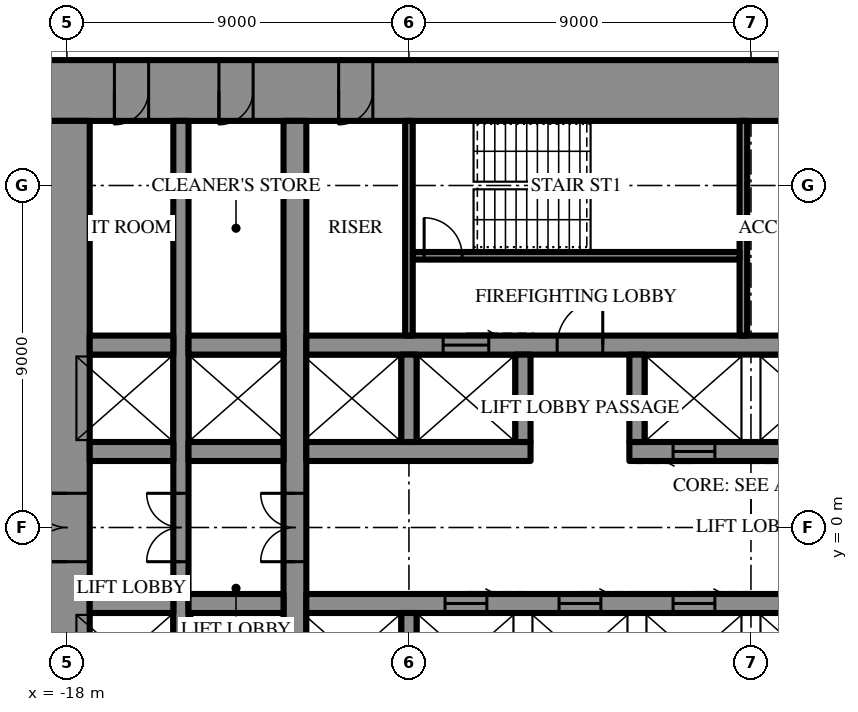
"""IFC4 building model, lengths in metres.
Left out: names, types, materials, properties, quantities, classifications, styles, units other than length and angle.
Written with IfcOpenShell. Run it as: python <this file> out.ifc"""

import sys

from ifc_helpers import new_model, si_unit, direction, frame, frame_2d, origin, place, context, subcontext, project, spatial, rectangle, extrude, element, fill, save


model = new_model("IFC4")
c1 = context("Model", 3, precision=1e-05, world=origin(), true_north=direction((0.0, 1.0)))
c2 = subcontext(c1, "Body", "Model", "MODEL_VIEW")
j1 = project(units=[si_unit("LENGTHUNIT", "METRE"), si_unit("PLANEANGLEUNIT", "RADIAN")], contexts=[c1])
p1 = place(None, origin())
s1 = spatial("IfcSite", under=j1, at=p1, CompositionType="ELEMENT")
p2 = place(p1, origin())
s2 = spatial("IfcBuilding", under=s1, at=p2, CompositionType="ELEMENT")
p3 = place(p2, frame((0.0, 0.0, 78.1)))
s3 = spatial("IfcBuildingStorey", under=s2, at=p3, CompositionType="ELEMENT", Elevation=78.1)
p4 = place(p3, frame((-18.6, 11.5, 0.0), z_axis=(0.0, 0.0, 1.0), x_axis=(1.0, 0.0, 0.0)))
e1 = element("IfcWall", 1, at=p4, inside=s3, PredefinedType="SHEAR", context=c2, shape_type="SweptSolid", body=[
    extrude(rectangle(XDim=37.2, YDim=1.6, at=frame_2d((18.6, 0.0))), origin(), (0.0, 0.0, 1.0), 4.2),
])
p5 = place(p4, frame((19.45, 0.0, 0.0)))
e2 = element("IfcOpeningElement", 2, at=p5, cuts=e1, PredefinedType="OPENING", context=c2, shape_type="SweptSolid", body=[
    extrude(rectangle(XDim=0.9, YDim=2.2, at=frame_2d((0.45, 1.1))), frame((0.0, 0.81, 0.0), z_axis=(0.0, -1.0, 0.0), x_axis=(1.0, 0.0, 0.0)), (0.0, 0.0, 1.0), 1.62),
])
p6 = place(p4, frame((22.45, 0.0, 0.0)))
e3 = element("IfcOpeningElement", 3, at=p6, cuts=e1, PredefinedType="OPENING", context=c2, shape_type="SweptSolid", body=[
    extrude(rectangle(XDim=0.9, YDim=2.2, at=frame_2d((0.45, 1.1))), frame((0.0, 0.81, 0.0), z_axis=(0.0, -1.0, 0.0), x_axis=(1.0, 0.0, 0.0)), (0.0, 0.0, 1.0), 1.62),
])
p7 = place(p4, frame((25.5, 0.0, 0.0)))
e4 = element("IfcOpeningElement", 4, at=p7, cuts=e1, PredefinedType="OPENING", context=c2, shape_type="SweptSolid", body=[
    extrude(rectangle(XDim=1.0, YDim=2.2, at=frame_2d((0.5, 1.1))), frame((0.0, 0.81, 0.0), z_axis=(0.0, -1.0, 0.0), x_axis=(1.0, 0.0, 0.0)), (0.0, 0.0, 1.0), 1.62),
])
p8 = place(p4, frame((1.85, 0.0, 0.0)))
e5 = element("IfcOpeningElement", 5, at=p8, cuts=e1, PredefinedType="OPENING", context=c2, shape_type="SweptSolid", body=[
    extrude(rectangle(XDim=0.9, YDim=2.2, at=frame_2d((0.45, 1.1))), frame((0.0, 0.81, 0.0), z_axis=(0.0, -1.0, 0.0), x_axis=(1.0, 0.0, 0.0)), (0.0, 0.0, 1.0), 1.62),
])
p9 = place(p4, frame((4.6, 0.0, 0.0)))
e6 = element("IfcOpeningElement", 6, at=p9, cuts=e1, PredefinedType="OPENING", context=c2, shape_type="SweptSolid", body=[
    extrude(rectangle(XDim=0.9, YDim=2.2, at=frame_2d((0.45, 1.1))), frame((0.0, 0.81, 0.0), z_axis=(0.0, -1.0, 0.0), x_axis=(1.0, 0.0, 0.0)), (0.0, 0.0, 1.0), 1.62),
])
p10 = place(p4, frame((7.75, 0.0, 0.0)))
e7 = element("IfcOpeningElement", 7, at=p10, cuts=e1, PredefinedType="OPENING", context=c2, shape_type="SweptSolid", body=[
    extrude(rectangle(XDim=0.9, YDim=2.2, at=frame_2d((0.45, 1.1))), frame((0.0, 0.81, 0.0), z_axis=(0.0, -1.0, 0.0), x_axis=(1.0, 0.0, 0.0)), (0.0, 0.0, 1.0), 1.62),
])
p11 = place(p4, frame((28.55, 0.0, 0.0)))
e8 = element("IfcOpeningElement", 8, at=p11, cuts=e1, PredefinedType="OPENING", context=c2, shape_type="SweptSolid", body=[
    extrude(rectangle(XDim=0.9, YDim=2.2, at=frame_2d((0.45, 1.1))), frame((0.0, 0.81, 0.0), z_axis=(0.0, -1.0, 0.0), x_axis=(1.0, 0.0, 0.0)), (0.0, 0.0, 1.0), 1.62),
])
p12 = place(p4, frame((31.7, 0.0, 0.0)))
e9 = element("IfcOpeningElement", 9, at=p12, cuts=e1, PredefinedType="OPENING", context=c2, shape_type="SweptSolid", body=[
    extrude(rectangle(XDim=0.9, YDim=2.2, at=frame_2d((0.45, 1.1))), frame((0.0, 0.81, 0.0), z_axis=(0.0, -1.0, 0.0), x_axis=(1.0, 0.0, 0.0)), (0.0, 0.0, 1.0), 1.62),
])
p13 = place(p4, frame((34.45, 0.0, 0.0)))
e10 = element("IfcOpeningElement", 10, at=p13, cuts=e1, PredefinedType="OPENING", context=c2, shape_type="SweptSolid", body=[
    extrude(rectangle(XDim=0.9, YDim=2.2, at=frame_2d((0.45, 1.1))), frame((0.0, 0.81, 0.0), z_axis=(0.0, -1.0, 0.0), x_axis=(1.0, 0.0, 0.0)), (0.0, 0.0, 1.0), 1.62),
])
p14 = place(p3, frame((-18.0, 10.7, 0.0), z_axis=(0.0, 0.0, 1.0), x_axis=(0.0, -1.0, 0.0)))
e11 = element("IfcWall", 11, at=p14, inside=s3, PredefinedType="SHEAR", context=c2, shape_type="SweptSolid", body=[
    extrude(rectangle(XDim=21.4, YDim=1.2, at=frame_2d((10.7, 0.0))), origin(), (0.0, 0.0, 1.0), 4.2),
])
p15 = place(p14, frame((9.8, 0.0, 0.0)))
e12 = element("IfcOpeningElement", 12, at=p15, cuts=e11, PredefinedType="OPENING", context=c2, shape_type="SweptSolid", body=[
    extrude(rectangle(XDim=1.8, YDim=2.4, at=frame_2d((0.9, 1.2))), frame((0.0, 0.61, 0.0), z_axis=(0.0, -1.0, 0.0), x_axis=(1.0, 0.0, 0.0)), (0.0, 0.0, 1.0), 1.22),
])
p16 = place(p3, frame((-12.0, -10.7, 0.0), z_axis=(0.0, 0.0, 1.0), x_axis=(0.0, 1.0, 0.0)))
e13 = element("IfcWall", 13, at=p16, inside=s3, PredefinedType="SHEAR", context=c2, shape_type="SweptSolid", body=[
    extrude(rectangle(XDim=21.4, YDim=0.6, at=frame_2d((10.7, 0.0))), origin(), (0.0, 0.0, 1.0), 4.2),
])
p17 = place(p16, frame((9.8, 0.0, 0.0)))
e14 = element("IfcOpeningElement", 14, at=p17, cuts=e13, PredefinedType="OPENING", context=c2, shape_type="SweptSolid", body=[
    extrude(rectangle(XDim=1.8, YDim=2.4, at=frame_2d((0.9, 1.2))), frame((0.0, 0.31, 0.0), z_axis=(0.0, -1.0, 0.0), x_axis=(1.0, 0.0, 0.0)), (0.0, 0.0, 1.0), 0.62),
])
p18 = place(p3, frame((-15.0, -10.7, 0.0), z_axis=(0.0, 0.0, 1.0), x_axis=(0.0, 1.0, 0.0)))
e15 = element("IfcWall", 15, at=p18, inside=s3, PredefinedType="SHEAR", context=c2, shape_type="SweptSolid", body=[
    extrude(rectangle(XDim=21.4, YDim=0.4, at=frame_2d((10.7, 0.0))), origin(), (0.0, 0.0, 1.0), 4.2),
])
p19 = place(p18, frame((9.8, 0.0, 0.0)))
e16 = element("IfcOpeningElement", 16, at=p19, cuts=e15, PredefinedType="OPENING", context=c2, shape_type="SweptSolid", body=[
    extrude(rectangle(XDim=1.8, YDim=2.4, at=frame_2d((0.9, 1.2))), frame((0.0, 0.21, 0.0), z_axis=(0.0, -1.0, 0.0), x_axis=(1.0, 0.0, 0.0)), (0.0, 0.0, 1.0), 0.42),
])
p20 = place(p3, frame((-17.4, 2.0, 0.0), z_axis=(0.0, 0.0, 1.0), x_axis=(1.0, 0.0, 0.0)))
e17 = element("IfcWall", 17, at=p20, inside=s3, PredefinedType="SHEAR", context=c2, shape_type="SweptSolid", body=[
    extrude(rectangle(XDim=2.2, YDim=0.5, at=frame_2d((1.1, 0.0))), origin(), (0.0, 0.0, 1.0), 4.2),
])
p21 = place(p3, frame((-14.8, 2.0, 0.0), z_axis=(0.0, 0.0, 1.0), x_axis=(1.0, 0.0, 0.0)))
e18 = element("IfcWall", 18, at=p21, inside=s3, PredefinedType="SHEAR", context=c2, shape_type="SweptSolid", body=[
    extrude(rectangle(XDim=2.5, YDim=0.5, at=frame_2d((1.25, 0.0))), origin(), (0.0, 0.0, 1.0), 4.2),
])
p22 = place(p3, frame((-11.7, 2.0, 0.0), z_axis=(0.0, 0.0, 1.0), x_axis=(1.0, 0.0, 0.0)))
e19 = element("IfcWall", 19, at=p22, inside=s3, PredefinedType="SHEAR", context=c2, shape_type="SweptSolid", body=[
    extrude(rectangle(XDim=5.9, YDim=0.5, at=frame_2d((2.95, 0.0))), origin(), (0.0, 0.0, 1.0), 4.2),
])
p23 = place(p3, frame((-3.2, 2.0, 0.0), z_axis=(0.0, 0.0, 1.0), x_axis=(1.0, 0.0, 0.0)))
e20 = element("IfcWall", 20, at=p23, inside=s3, PredefinedType="SHEAR", context=c2, shape_type="SweptSolid", body=[
    extrude(rectangle(XDim=14.9, YDim=0.5, at=frame_2d((7.45, 0.0))), origin(), (0.0, 0.0, 1.0), 4.2),
])
p24 = place(p23, frame((1.15, 0.0, 0.0)))
e21 = element("IfcOpeningElement", 21, at=p24, cuts=e20, PredefinedType="OPENING", context=c2, shape_type="SweptSolid", body=[
    extrude(rectangle(XDim=1.1, YDim=2.2, at=frame_2d((0.55, 1.1))), frame((0.0, 0.26, 0.0), z_axis=(0.0, -1.0, 0.0), x_axis=(1.0, 0.0, 0.0)), (0.0, 0.0, 1.0), 0.52),
])
p25 = place(p23, frame((4.15, 0.0, 0.0)))
e22 = element("IfcOpeningElement", 22, at=p25, cuts=e20, PredefinedType="OPENING", context=c2, shape_type="SweptSolid", body=[
    extrude(rectangle(XDim=1.1, YDim=2.2, at=frame_2d((0.55, 1.1))), frame((0.0, 0.26, 0.0), z_axis=(0.0, -1.0, 0.0), x_axis=(1.0, 0.0, 0.0)), (0.0, 0.0, 1.0), 0.52),
])
p26 = place(p23, frame((7.15, 0.0, 0.0)))
e23 = element("IfcOpeningElement", 23, at=p26, cuts=e20, PredefinedType="OPENING", context=c2, shape_type="SweptSolid", body=[
    extrude(rectangle(XDim=1.1, YDim=2.2, at=frame_2d((0.55, 1.1))), frame((0.0, 0.26, 0.0), z_axis=(0.0, -1.0, 0.0), x_axis=(1.0, 0.0, 0.0)), (0.0, 0.0, 1.0), 0.52),
])
p27 = place(p23, frame((10.15, 0.0, 0.0)))
e24 = element("IfcOpeningElement", 24, at=p27, cuts=e20, PredefinedType="OPENING", context=c2, shape_type="SweptSolid", body=[
    extrude(rectangle(XDim=1.1, YDim=2.2, at=frame_2d((0.55, 1.1))), frame((0.0, 0.26, 0.0), z_axis=(0.0, -1.0, 0.0), x_axis=(1.0, 0.0, 0.0)), (0.0, 0.0, 1.0), 0.52),
])
p28 = place(p3, frame((-17.4, 4.8, 0.0), z_axis=(0.0, 0.0, 1.0), x_axis=(1.0, 0.0, 0.0)))
e25 = element("IfcWall", 25, at=p28, inside=s3, PredefinedType="SHEAR", context=c2, shape_type="SweptSolid", body=[
    extrude(rectangle(XDim=2.2, YDim=0.5, at=frame_2d((1.1, 0.0))), origin(), (0.0, 0.0, 1.0), 4.2),
])
p29 = place(p3, frame((-14.8, 4.8, 0.0), z_axis=(0.0, 0.0, 1.0), x_axis=(1.0, 0.0, 0.0)))
e26 = element("IfcWall", 26, at=p29, inside=s3, PredefinedType="SHEAR", context=c2, shape_type="SweptSolid", body=[
    extrude(rectangle(XDim=2.5, YDim=0.5, at=frame_2d((1.25, 0.0))), origin(), (0.0, 0.0, 1.0), 4.2),
])
p30 = place(p3, frame((-11.7, 4.8, 0.0), z_axis=(0.0, 0.0, 1.0), x_axis=(1.0, 0.0, 0.0)))
e27 = element("IfcWall", 27, at=p30, inside=s3, PredefinedType="SHEAR", context=c2, shape_type="SweptSolid", body=[
    extrude(rectangle(XDim=23.4, YDim=0.5, at=frame_2d((11.7, 0.0))), origin(), (0.0, 0.0, 1.0), 4.2),
])
p31 = place(p30, frame((6.6, 0.0, 0.0)))
e28 = element("IfcOpeningElement", 28, at=p31, cuts=e27, PredefinedType="OPENING", context=c2, shape_type="SweptSolid", body=[
    extrude(rectangle(XDim=1.2, YDim=2.2, at=frame_2d((0.6, 1.1))), frame((0.0, 0.26, 0.0), z_axis=(0.0, -1.0, 0.0), x_axis=(1.0, 0.0, 0.0)), (0.0, 0.0, 1.0), 0.52),
])
p32 = place(p30, frame((3.6, 0.0, 0.0)))
e29 = element("IfcOpeningElement", 29, at=p32, cuts=e27, PredefinedType="OPENING", context=c2, shape_type="SweptSolid", body=[
    extrude(rectangle(XDim=1.2, YDim=2.2, at=frame_2d((0.6, 1.1))), frame((0.0, 0.26, 0.0), z_axis=(0.0, -1.0, 0.0), x_axis=(1.0, 0.0, 0.0)), (0.0, 0.0, 1.0), 0.52),
])
for number, where, z_axis, x_axis in (
    (30, (-9.0, 2.25, 0.0), (0.0, 0.0, 1.0), (0.0, 1.0, 0.0)),
    (31, (-6.0, 2.25, 0.0), (0.0, 0.0, 1.0), (0.0, 1.0, 0.0)),
    (32, (-3.0, 2.25, 0.0), (0.0, 0.0, 1.0), (0.0, 1.0, 0.0)),
):
    element("IfcWall", number, at=place(p3, frame(where, z_axis=z_axis, x_axis=x_axis)), inside=s3, PredefinedType="SHEAR", context=c2, shape_type="SweptSolid", body=[
        extrude(rectangle(XDim=2.3, YDim=0.4, at=frame_2d((1.15, 0.0))), origin(), (0.0, 0.0, 1.0), 4.2),
    ])
p33 = place(p3, frame((-0.2, 5.05, 0.0), z_axis=(0.0, 0.0, 1.0), x_axis=(0.0, 1.0, 0.0)))
e33 = element("IfcWall", 33, at=p33, inside=s3, PredefinedType="SHEAR", context=c2, shape_type="SweptSolid", body=[
    extrude(rectangle(XDim=5.65, YDim=0.2, at=frame_2d((2.825, 0.0))), origin(), (0.0, 0.0, 1.0), 4.2),
])
p34 = place(p3, frame((-8.9, 7.15, 0.0), z_axis=(0.0, 0.0, 1.0), x_axis=(1.0, 0.0, 0.0)))
e34 = element("IfcWall", 34, at=p34, inside=s3, PredefinedType="SHEAR", context=c2, shape_type="SweptSolid", body=[
    extrude(rectangle(XDim=8.6, YDim=0.2, at=frame_2d((4.3, 0.0))), origin(), (0.0, 0.0, 1.0), 4.2),
])
p35 = place(p34, frame((0.3, 0.0, 0.0)))
e35 = element("IfcOpeningElement", 35, at=p35, cuts=e34, PredefinedType="OPENING", context=c2, shape_type="SweptSolid", body=[
    extrude(rectangle(XDim=1.0, YDim=2.2, at=frame_2d((0.5, 1.1))), frame((0.0, 0.11, 0.0), z_axis=(0.0, -1.0, 0.0), x_axis=(1.0, 0.0, 0.0)), (0.0, 0.0, 1.0), 0.22),
])
p36 = place(p3, frame((3.2, -2.0, 0.0), z_axis=(0.0, 0.0, 1.0), x_axis=(-1.0, 0.0, 0.0)))
e36 = element("IfcWall", 36, at=p36, inside=s3, PredefinedType="SHEAR", context=c2, shape_type="SweptSolid", body=[
    extrude(rectangle(XDim=14.9, YDim=0.5, at=frame_2d((7.45, 0.0))), origin(), (0.0, 0.0, 1.0), 4.2),
])
p37 = place(p36, frame((1.15, 0.0, 0.0)))
e37 = element("IfcOpeningElement", 37, at=p37, cuts=e36, PredefinedType="OPENING", context=c2, shape_type="SweptSolid", body=[
    extrude(rectangle(XDim=1.1, YDim=2.2, at=frame_2d((0.55, 1.1))), frame((0.0, 0.26, 0.0), z_axis=(0.0, -1.0, 0.0), x_axis=(1.0, 0.0, 0.0)), (0.0, 0.0, 1.0), 0.52),
])
p38 = place(p36, frame((4.15, 0.0, 0.0)))
e38 = element("IfcOpeningElement", 38, at=p38, cuts=e36, PredefinedType="OPENING", context=c2, shape_type="SweptSolid", body=[
    extrude(rectangle(XDim=1.1, YDim=2.2, at=frame_2d((0.55, 1.1))), frame((0.0, 0.26, 0.0), z_axis=(0.0, -1.0, 0.0), x_axis=(1.0, 0.0, 0.0)), (0.0, 0.0, 1.0), 0.52),
])
p39 = place(p36, frame((7.15, 0.0, 0.0)))
e39 = element("IfcOpeningElement", 39, at=p39, cuts=e36, PredefinedType="OPENING", context=c2, shape_type="SweptSolid", body=[
    extrude(rectangle(XDim=1.1, YDim=2.2, at=frame_2d((0.55, 1.1))), frame((0.0, 0.26, 0.0), z_axis=(0.0, -1.0, 0.0), x_axis=(1.0, 0.0, 0.0)), (0.0, 0.0, 1.0), 0.52),
])
p40 = place(p36, frame((10.15, 0.0, 0.0)))
e40 = element("IfcOpeningElement", 40, at=p40, cuts=e36, PredefinedType="OPENING", context=c2, shape_type="SweptSolid", body=[
    extrude(rectangle(XDim=1.1, YDim=2.2, at=frame_2d((0.55, 1.1))), frame((0.0, 0.26, 0.0), z_axis=(0.0, -1.0, 0.0), x_axis=(1.0, 0.0, 0.0)), (0.0, 0.0, 1.0), 0.52),
])
p41 = place(p3, frame((-12.3, -2.0, 0.0), z_axis=(0.0, 0.0, 1.0), x_axis=(-1.0, 0.0, 0.0)))
e41 = element("IfcWall", 41, at=p41, inside=s3, PredefinedType="SHEAR", context=c2, shape_type="SweptSolid", body=[
    extrude(rectangle(XDim=2.5, YDim=0.5, at=frame_2d((1.25, 0.0))), origin(), (0.0, 0.0, 1.0), 4.2),
])
p42 = place(p3, frame((-15.2, -2.0, 0.0), z_axis=(0.0, 0.0, 1.0), x_axis=(-1.0, 0.0, 0.0)))
e42 = element("IfcWall", 42, at=p42, inside=s3, PredefinedType="SHEAR", context=c2, shape_type="SweptSolid", body=[
    extrude(rectangle(XDim=2.2, YDim=0.5, at=frame_2d((1.1, 0.0))), origin(), (0.0, 0.0, 1.0), 4.2),
])
p43 = place(p3, frame((-9.0, -2.25, 0.0), z_axis=(0.0, 0.0, 1.0), x_axis=(0.0, -1.0, 0.0)))
e43 = element("IfcWall", 43, at=p43, inside=s3, PredefinedType="SHEAR", context=c2, shape_type="SweptSolid", body=[
    extrude(rectangle(XDim=2.3, YDim=0.4, at=frame_2d((1.15, 0.0))), origin(), (0.0, 0.0, 1.0), 4.2),
])
p44 = place(p3, frame((-9.0, 5.05, 0.0), z_axis=(0.0, 0.0, 1.0), x_axis=(0.0, 1.0, 0.0)))
e44 = element("IfcWall", 44, at=p44, inside=s3, PredefinedType="PARTITIONING", context=c2, shape_type="SweptSolid", body=[
    extrude(rectangle(XDim=5.65, YDim=0.2, at=frame_2d((2.825, 0.0))), origin(), (0.0, 0.0, 1.0), 4.0),
])
p45 = place(p15, frame((1.8, 0.0, 0.0), z_axis=(0.0, 0.0, 1.0), x_axis=(-1.0, 0.0, 0.0)))
e45 = element("IfcDoor", 45, at=p45, inside=s3, OperationType="DOUBLE_DOOR_SINGLE_SWING", PredefinedType="DOOR", context=c2, shape_type="SweptSolid", body=[
    extrude(rectangle(XDim=1.8, YDim=2.4, at=frame_2d((0.9, 1.2))), frame((0.0, 0.025, 0.0), z_axis=(0.0, -1.0, 0.0), x_axis=(1.0, 0.0, 0.0)), (0.0, 0.0, 1.0), 0.05),
])
fill(e12, e45)
p46 = place(p31, origin())
e46 = element("IfcDoor", 46, at=p46, inside=s3, OperationType="SINGLE_SWING_LEFT", PredefinedType="DOOR", context=c2, shape_type="SweptSolid", body=[
    extrude(rectangle(XDim=1.2, YDim=2.2, at=frame_2d((0.6, 1.1))), frame((0.0, 0.025, 0.0), z_axis=(0.0, -1.0, 0.0), x_axis=(1.0, 0.0, 0.0)), (0.0, 0.0, 1.0), 0.05),
])
fill(e28, e46)
p47 = place(p35, origin())
e47 = element("IfcDoor", 47, at=p47, inside=s3, OperationType="SINGLE_SWING_RIGHT", PredefinedType="DOOR", context=c2, shape_type="SweptSolid", body=[
    extrude(rectangle(XDim=1.0, YDim=2.2, at=frame_2d((0.5, 1.1))), frame((0.0, 0.025, 0.0), z_axis=(0.0, -1.0, 0.0), x_axis=(1.0, 0.0, 0.0)), (0.0, 0.0, 1.0), 0.05),
])
fill(e35, e47)
p48 = place(p8, frame((0.9, 0.0, 0.0), z_axis=(0.0, 0.0, 1.0), x_axis=(-1.0, 0.0, 0.0)))
e48 = element("IfcDoor", 48, at=p48, inside=s3, OperationType="SINGLE_SWING_LEFT", PredefinedType="DOOR", context=c2, shape_type="SweptSolid", body=[
    extrude(rectangle(XDim=0.9, YDim=2.2, at=frame_2d((0.45, 1.1))), frame((0.0, 0.025, 0.0), z_axis=(0.0, -1.0, 0.0), x_axis=(1.0, 0.0, 0.0)), (0.0, 0.0, 1.0), 0.05),
])
fill(e5, e48)
p49 = place(p9, frame((0.9, 0.0, 0.0), z_axis=(0.0, 0.0, 1.0), x_axis=(-1.0, 0.0, 0.0)))
e49 = element("IfcDoor", 49, at=p49, inside=s3, OperationType="SINGLE_SWING_LEFT", PredefinedType="DOOR", context=c2, shape_type="SweptSolid", body=[
    extrude(rectangle(XDim=0.9, YDim=2.2, at=frame_2d((0.45, 1.1))), frame((0.0, 0.025, 0.0), z_axis=(0.0, -1.0, 0.0), x_axis=(1.0, 0.0, 0.0)), (0.0, 0.0, 1.0), 0.05),
])
fill(e6, e49)
p50 = place(p10, frame((0.9, 0.0, 0.0), z_axis=(0.0, 0.0, 1.0), x_axis=(-1.0, 0.0, 0.0)))
e50 = element("IfcDoor", 50, at=p50, inside=s3, OperationType="SINGLE_SWING_LEFT", PredefinedType="DOOR", context=c2, shape_type="SweptSolid", body=[
    extrude(rectangle(XDim=0.9, YDim=2.2, at=frame_2d((0.45, 1.1))), frame((0.0, 0.025, 0.0), z_axis=(0.0, -1.0, 0.0), x_axis=(1.0, 0.0, 0.0)), (0.0, 0.0, 1.0), 0.05),
])
fill(e7, e50)
p51 = place(p17, origin())
e51 = element("IfcDoor", 51, at=p51, inside=s3, OperationType="DOUBLE_DOOR_SINGLE_SWING", PredefinedType="DOOR", context=c2, shape_type="SweptSolid", body=[
    extrude(rectangle(XDim=1.8, YDim=2.4, at=frame_2d((0.9, 1.2))), frame((0.0, 0.025, 0.0), z_axis=(0.0, -1.0, 0.0), x_axis=(1.0, 0.0, 0.0)), (0.0, 0.0, 1.0), 0.05),
])
fill(e14, e51)
p52 = place(p19, origin())
e52 = element("IfcDoor", 52, at=p52, inside=s3, OperationType="DOUBLE_DOOR_SINGLE_SWING", PredefinedType="DOOR", context=c2, shape_type="SweptSolid", body=[
    extrude(rectangle(XDim=1.8, YDim=2.4, at=frame_2d((0.9, 1.2))), frame((0.0, 0.025, 0.0), z_axis=(0.0, -1.0, 0.0), x_axis=(1.0, 0.0, 0.0)), (0.0, 0.0, 1.0), 0.05),
])
fill(e16, e52)
p53 = place(p32, origin())
e53 = element("IfcDoor", 53, at=p53, inside=s3, OperationType="SLIDING_TO_LEFT", PredefinedType="DOOR", context=c2, shape_type="SweptSolid", body=[
    extrude(rectangle(XDim=1.2, YDim=2.2, at=frame_2d((0.6, 1.1))), frame((0.0, 0.025, 0.0), z_axis=(0.0, -1.0, 0.0), x_axis=(1.0, 0.0, 0.0)), (0.0, 0.0, 1.0), 0.05),
])
fill(e29, e53)
p54 = place(p24, frame((1.1, 0.0, 0.0), z_axis=(0.0, 0.0, 1.0), x_axis=(-1.0, 0.0, 0.0)))
e54 = element("IfcDoor", 54, at=p54, inside=s3, OperationType="SLIDING_TO_LEFT", PredefinedType="DOOR", context=c2, shape_type="SweptSolid", body=[
    extrude(rectangle(XDim=1.1, YDim=2.2, at=frame_2d((0.55, 1.1))), frame((0.0, 0.025, 0.0), z_axis=(0.0, -1.0, 0.0), x_axis=(1.0, 0.0, 0.0)), (0.0, 0.0, 1.0), 0.05),
])
fill(e21, e54)
p55 = place(p38, frame((1.1, 0.0, 0.0), z_axis=(0.0, 0.0, 1.0), x_axis=(-1.0, 0.0, 0.0)))
e55 = element("IfcDoor", 55, at=p55, inside=s3, OperationType="SLIDING_TO_LEFT", PredefinedType="DOOR", context=c2, shape_type="SweptSolid", body=[
    extrude(rectangle(XDim=1.1, YDim=2.2, at=frame_2d((0.55, 1.1))), frame((0.0, 0.025, 0.0), z_axis=(0.0, -1.0, 0.0), x_axis=(1.0, 0.0, 0.0)), (0.0, 0.0, 1.0), 0.05),
])
fill(e38, e55)
p56 = place(p39, frame((1.1, 0.0, 0.0), z_axis=(0.0, 0.0, 1.0), x_axis=(-1.0, 0.0, 0.0)))
e56 = element("IfcDoor", 56, at=p56, inside=s3, OperationType="SLIDING_TO_LEFT", PredefinedType="DOOR", context=c2, shape_type="SweptSolid", body=[
    extrude(rectangle(XDim=1.1, YDim=2.2, at=frame_2d((0.55, 1.1))), frame((0.0, 0.025, 0.0), z_axis=(0.0, -1.0, 0.0), x_axis=(1.0, 0.0, 0.0)), (0.0, 0.0, 1.0), 0.05),
])
fill(e39, e56)
p57 = place(p40, frame((1.1, 0.0, 0.0), z_axis=(0.0, 0.0, 1.0), x_axis=(-1.0, 0.0, 0.0)))
e57 = element("IfcDoor", 57, at=p57, inside=s3, OperationType="SLIDING_TO_LEFT", PredefinedType="DOOR", context=c2, shape_type="SweptSolid", body=[
    extrude(rectangle(XDim=1.1, YDim=2.2, at=frame_2d((0.55, 1.1))), frame((0.0, 0.025, 0.0), z_axis=(0.0, -1.0, 0.0), x_axis=(1.0, 0.0, 0.0)), (0.0, 0.0, 1.0), 0.05),
])
fill(e40, e57)
save(model, sys.argv[1])
